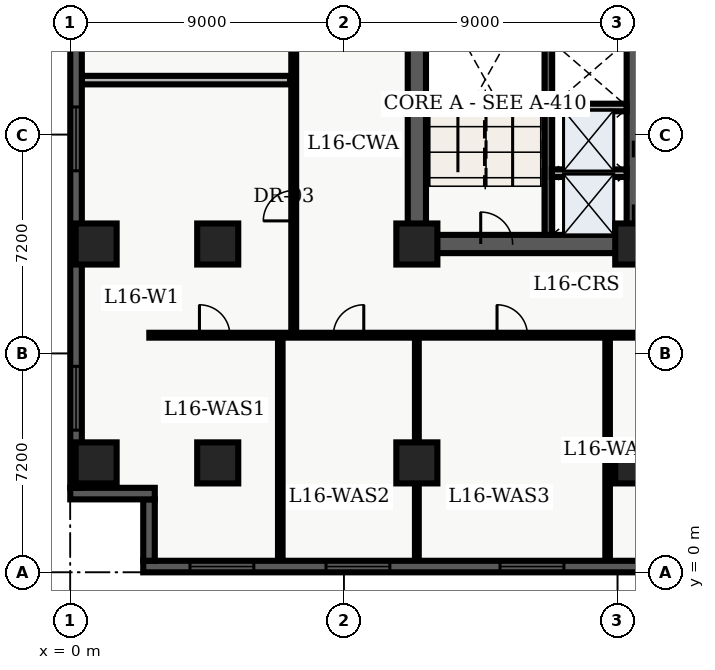
"""IFC4 building model, lengths in metres.
Left out: names, types, materials, properties, quantities, classifications, styles, units other than length and angle.
Written with IfcOpenShell. Run it as: python <this file> out.ifc"""

import sys

from ifc_helpers import new_model, entity, si_unit, converted_unit, direction, frame, origin_with_axes, origin_2d_with_axis, place, context, subcontext, project, spatial, polyline, rectangle, outline, extrude, element, fill, save


model = new_model("IFC4")
c1 = context("Model", 3, precision=1e-05, world=origin_with_axes(), true_north=direction((0.0, 1.0)))
c2 = subcontext(c1, "Body", "Model", "MODEL_VIEW")
j1 = project(units=[si_unit("LENGTHUNIT", "METRE"), converted_unit("PLANEANGLEUNIT", "DEGREE", entity("IfcPlaneAngleMeasure", 0.017), si_unit("PLANEANGLEUNIT", "RADIAN"), dimensions=[0, 0, 0, 0, 0, 0, 0])], contexts=[c1])
p1 = place(None, origin_with_axes())
s1 = spatial("IfcSite", under=j1, at=p1, CompositionType="ELEMENT")
p2 = place(p1, origin_with_axes())
s2 = spatial("IfcBuilding", under=s1, at=p2, CompositionType="ELEMENT")
p3 = place(p2, frame((0.0, 0.0, 67.8), z_axis=(0.0, 0.0, 1.0), x_axis=(1.0, 0.0, 0.0)))
s3 = spatial("IfcBuildingStorey", under=s2, at=p3, CompositionType="ELEMENT", Elevation=67.8)
p4 = place(p3, frame((11.4, 10.8, 0.0), z_axis=(0.0, 0.0, 1.0), x_axis=(0.0, 1.0, 0.0)))
e1 = element("IfcWall", 1, at=p4, inside=s3, PredefinedType="SHEAR", context=c2, shape_type="SweptSolid", body=[
    extrude(outline(polyline([(0.0, -0.3), (27.0, -0.3), (27.0, 0.3), (0.0, 0.3), (0.0, -0.3)])), origin_with_axes(), (0.0, 0.0, 1.0), 3.66),
])
p5 = place(p3, frame((11.4, 10.8, 0.0), z_axis=(0.0, 0.0, 1.0), x_axis=(1.0, 0.0, 0.0)))
e2 = element("IfcWall", 2, at=p5, inside=s3, PredefinedType="SHEAR", context=c2, shape_type="SweptSolid", body=[
    extrude(outline(polyline([(0.0, -0.3), (7.2, -0.3), (7.2, 0.3), (0.0, 0.3), (0.0, -0.3)])), origin_with_axes(), (0.0, 0.0, 1.0), 3.66),
])
p6 = place(p5, frame((2.625, 0.0, 0.0), z_axis=(0.0, 0.0, 1.0), x_axis=(1.0, 0.0, 0.0)))
e3 = element("IfcOpeningElement", 3, at=p6, cuts=e2, PredefinedType="OPENING", context=c2, shape_type="SweptSolid", body=[
    extrude(rectangle(XDim=1.05, YDim=0.62, at=origin_2d_with_axis()), origin_with_axes(), (0.0, 0.0, 1.0), 2.15),
])
p7 = place(p3, frame((18.6, 10.8, 0.0), z_axis=(0.0, 0.0, 1.0), x_axis=(0.0, 1.0, 0.0)))
e4 = element("IfcWall", 4, at=p7, inside=s3, PredefinedType="SHEAR", context=c2, shape_type="SweptSolid", body=[
    extrude(outline(polyline([(0.0, -0.3), (13.5, -0.3), (13.5, 0.3), (0.0, 0.3), (0.0, -0.3)])), origin_with_axes(), (0.0, 0.0, 1.0), 3.66),
])
p8 = place(p7, frame((1.3, 0.0, 0.0), z_axis=(0.0, 0.0, 1.0), x_axis=(1.0, 0.0, 0.0)))
e5 = element("IfcOpeningElement", 5, at=p8, cuts=e4, PredefinedType="OPENING", context=c2, shape_type="SweptSolid", body=[
    extrude(rectangle(XDim=1.1, YDim=0.62, at=origin_2d_with_axis()), origin_with_axes(), (0.0, 0.0, 1.0), 2.15),
])
p9 = place(p7, frame((3.4, 0.0, 0.0), z_axis=(0.0, 0.0, 1.0), x_axis=(1.0, 0.0, 0.0)))
e6 = element("IfcOpeningElement", 6, at=p9, cuts=e4, PredefinedType="OPENING", context=c2, shape_type="SweptSolid", body=[
    extrude(rectangle(XDim=1.1, YDim=0.62, at=origin_2d_with_axis()), origin_with_axes(), (0.0, 0.0, 1.0), 2.15),
])
p10 = place(p7, frame((11.125, 0.0, 0.0), z_axis=(0.0, 0.0, 1.0), x_axis=(1.0, 0.0, 0.0)))
e7 = element("IfcOpeningElement", 7, at=p10, cuts=e4, PredefinedType="OPENING", context=c2, shape_type="SweptSolid", body=[
    extrude(rectangle(XDim=1.05, YDim=0.62, at=origin_2d_with_axis()), origin_with_axes(), (0.0, 0.0, 1.0), 2.15),
])
p11 = place(p3, frame((15.725, 11.1, 0.0), z_axis=(0.0, 0.0, 1.0), x_axis=(0.0, 1.0, 0.0)))
e8 = element("IfcWall", 8, at=p11, inside=s3, PredefinedType="SHEAR", context=c2, shape_type="SweptSolid", body=[
    extrude(outline(polyline([(0.0, -0.125), (8.6, -0.125), (8.6, 0.125), (0.0, 0.125), (0.0, -0.125)])), origin_with_axes(), (0.0, 0.0, 1.0), 3.66),
])
for number, where, z_axis, x_axis in (
    (9, (11.4, 3.6, 0.0), (0.0, 0.0, 1.0), (1.0, 0.0, 0.0)),
    (10, (11.4, 10.8, 0.0), (0.0, 0.0, 1.0), (1.0, 0.0, 0.0)),
    (11, (18.6, 3.6, 0.0), (0.0, 0.0, 1.0), (1.0, 0.0, 0.0)),
    (12, (18.6, 10.8, 0.0), (0.0, 0.0, 1.0), (1.0, 0.0, 0.0)),
    (13, (4.85, 3.6, 0.0), (0.0, 0.0, 1.0), (1.0, 0.0, 0.0)),
    (14, (4.85, 10.8, 0.0), (0.0, 0.0, 1.0), (1.0, 0.0, 0.0)),
    (15, (0.85, 3.6, 0.0), (0.0, 0.0, 1.0), (1.0, 0.0, 0.0)),
    (16, (0.85, 10.8, 0.0), (0.0, 0.0, 1.0), (1.0, 0.0, 0.0)),
):
    element("IfcColumn", number, at=place(p3, frame(where, z_axis=z_axis, x_axis=x_axis)), inside=s3, PredefinedType="COLUMN", context=c2, shape_type="SweptSolid", body=[
        extrude(rectangle(XDim=1.35, YDim=1.35, at=origin_2d_with_axis()), origin_with_axes(), (0.0, 0.0, 1.0), 3.9),
    ])
for number, where, z_axis, x_axis in (
    (17, (15.84, 13.13, 0.0), (0.0, 0.0, 1.0), (1.0, 0.0, 0.0)),
    (18, (15.84, 15.29, 0.0), (0.0, 0.0, 1.0), (1.0, 0.0, 0.0)),
):
    element("IfcWall", number, at=place(p3, frame(where, z_axis=z_axis, x_axis=x_axis)), inside=s3, PredefinedType="SOLIDWALL", context=c2, shape_type="SweptSolid", body=[
        extrude(outline(polyline([(0.0, -0.125), (2.46, -0.125), (2.46, 0.125), (0.0, 0.125), (0.0, -0.125)])), origin_with_axes(), (0.0, 0.0, 1.0), 2.7),
    ])
p12 = place(p3, frame((2.6, 7.8, 0.0), z_axis=(0.0, 0.0, 1.0), x_axis=(1.0, 0.0, 0.0)))
e19 = element("IfcWall", 19, at=p12, inside=s3, PredefinedType="PARTITIONING", context=c2, shape_type="SweptSolid", body=[
    extrude(outline(polyline([(0.0, -0.08), (18.55, -0.08), (18.55, 0.08), (0.0, 0.08), (0.0, -0.08)])), origin_with_axes(), (0.0, 0.0, 1.0), 2.7),
])
p13 = place(p12, frame((2.149, 0.0, 0.0), z_axis=(0.0, 0.0, 1.0), x_axis=(1.0, 0.0, 0.0)))
e20 = element("IfcOpeningElement", 20, at=p13, cuts=e19, PredefinedType="OPENING", context=c2, shape_type="SweptSolid", body=[
    extrude(rectangle(XDim=1.0, YDim=0.18, at=origin_2d_with_axis()), origin_with_axes(), (0.0, 0.0, 1.0), 2.15),
])
p14 = place(p12, frame((6.554, 0.0, 0.0), z_axis=(0.0, 0.0, 1.0), x_axis=(1.0, 0.0, 0.0)))
e21 = element("IfcOpeningElement", 21, at=p14, cuts=e19, PredefinedType="OPENING", context=c2, shape_type="SweptSolid", body=[
    extrude(rectangle(XDim=1.0, YDim=0.18, at=origin_2d_with_axis()), origin_with_axes(), (0.0, 0.0, 1.0), 2.15),
])
p15 = place(p12, frame((11.937, 0.0, 0.0), z_axis=(0.0, 0.0, 1.0), x_axis=(1.0, 0.0, 0.0)))
e22 = element("IfcOpeningElement", 22, at=p15, cuts=e19, PredefinedType="OPENING", context=c2, shape_type="SweptSolid", body=[
    extrude(rectangle(XDim=1.0, YDim=0.18, at=origin_2d_with_axis()), origin_with_axes(), (0.0, 0.0, 1.0), 2.15),
])
p16 = place(p12, frame((16.507, 0.0, 0.0), z_axis=(0.0, 0.0, 1.0), x_axis=(1.0, 0.0, 0.0)))
e23 = element("IfcOpeningElement", 23, at=p16, cuts=e19, PredefinedType="OPENING", context=c2, shape_type="SweptSolid", body=[
    extrude(rectangle(XDim=1.0, YDim=0.18, at=origin_2d_with_axis()), origin_with_axes(), (0.0, 0.0, 1.0), 2.15),
])
p17 = place(p3, frame((7.35, 7.8, 0.0), z_axis=(0.0, 0.0, 1.0), x_axis=(0.0, 1.0, 0.0)))
e24 = element("IfcWall", 24, at=p17, inside=s3, PredefinedType="PARTITIONING", context=c2, shape_type="SweptSolid", body=[
    extrude(outline(polyline([(0.0, -0.08), (32.7, -0.08), (32.7, 0.08), (0.0, 0.08), (0.0, -0.08)])), origin_with_axes(), (0.0, 0.0, 1.0), 2.7),
])
p18 = place(p17, frame((4.261, 0.0, 0.0), z_axis=(0.0, 0.0, 1.0), x_axis=(1.0, 0.0, 0.0)))
e25 = element("IfcOpeningElement", 25, at=p18, cuts=e24, PredefinedType="OPENING", context=c2, shape_type="SweptSolid", body=[
    extrude(rectangle(XDim=1.0, YDim=0.18, at=origin_2d_with_axis()), origin_with_axes(), (0.0, 0.0, 1.0), 2.15),
])
p19 = place(p17, frame((13.729, 0.0, 0.0), z_axis=(0.0, 0.0, 1.0), x_axis=(1.0, 0.0, 0.0)))
e26 = element("IfcOpeningElement", 26, at=p19, cuts=e24, PredefinedType="OPENING", context=c2, shape_type="SweptSolid", body=[
    extrude(rectangle(XDim=1.0, YDim=0.18, at=origin_2d_with_axis()), origin_with_axes(), (0.0, 0.0, 1.0), 2.15),
])
p20 = place(p17, frame((25.819, 0.0, 0.0), z_axis=(0.0, 0.0, 1.0), x_axis=(1.0, 0.0, 0.0)))
e27 = element("IfcOpeningElement", 27, at=p20, cuts=e24, PredefinedType="OPENING", context=c2, shape_type="SweptSolid", body=[
    extrude(rectangle(XDim=1.0, YDim=0.18, at=origin_2d_with_axis()), origin_with_axes(), (0.0, 0.0, 1.0), 2.15),
])
p21 = place(p3, frame((0.375, 16.191, 0.0), z_axis=(0.0, 0.0, 1.0), x_axis=(1.0, 0.0, 0.0)))
e28 = element("IfcWall", 28, at=p21, inside=s3, PredefinedType="PARTITIONING", context=c2, shape_type="SweptSolid", body=[
    extrude(outline(polyline([(0.0, -0.14), (6.855, -0.14), (6.855, 0.14), (0.0, 0.14), (0.0, -0.14)])), origin_with_axes(), (0.0, 0.0, 1.0), 2.7),
])
p22 = place(p3, frame((6.908, 0.36, 0.0), z_axis=(0.0, 0.0, 1.0), x_axis=(0.0, 1.0, 0.0)))
e29 = element("IfcWall", 29, at=p22, inside=s3, PredefinedType="PARTITIONING", context=c2, shape_type="SweptSolid", body=[
    extrude(outline(polyline([(0.0, -0.075), (7.34, -0.075), (7.34, 0.075), (0.0, 0.075), (0.0, -0.075)])), origin_with_axes(), (0.0, 0.0, 1.0), 2.7),
])
p23 = place(p3, frame((11.4, 0.36, 0.0), z_axis=(0.0, 0.0, 1.0), x_axis=(0.0, 1.0, 0.0)))
e30 = element("IfcWall", 30, at=p23, inside=s3, PredefinedType="PARTITIONING", context=c2, shape_type="SweptSolid", body=[
    extrude(outline(polyline([(0.0, -0.062), (7.34, -0.062), (7.34, 0.062), (0.0, 0.062), (0.0, -0.062)])), origin_with_axes(), (0.0, 0.0, 1.0), 2.7),
])
p24 = place(p3, frame((17.674, 0.36, 0.0), z_axis=(0.0, 0.0, 1.0), x_axis=(0.0, 1.0, 0.0)))
e31 = element("IfcWall", 31, at=p24, inside=s3, PredefinedType="PARTITIONING", context=c2, shape_type="SweptSolid", body=[
    extrude(outline(polyline([(0.0, -0.075), (7.34, -0.075), (7.34, 0.075), (0.0, 0.075), (0.0, -0.075)])), origin_with_axes(), (0.0, 0.0, 1.0), 2.7),
])
p25 = place(p3, frame((57.22, 0.19, 0.0), z_axis=(0.0, 0.0, 1.0), x_axis=(-1.0, 0.0, 0.0)))
e32 = element("IfcWall", 32, at=p25, inside=s3, PredefinedType="SOLIDWALL", context=c2, shape_type="SweptSolid", body=[
    extrude(outline(polyline([(0.0, -0.19), (54.82, -0.19), (54.82, 0.19), (0.0, 0.19), (0.0, -0.19)])), origin_with_axes(), (0.0, 0.0, 1.0), 3.66),
])
p26 = place(p25, frame((3.037, 0.0, 0.45), z_axis=(0.0, 0.0, 1.0), x_axis=(1.0, 0.0, 0.0)))
e33 = element("IfcOpeningElement", 33, at=p26, cuts=e32, PredefinedType="OPENING", context=c2, shape_type="SweptSolid", body=[
    extrude(rectangle(XDim=2.1, YDim=0.4, at=origin_2d_with_axis()), origin_with_axes(), (0.0, 0.0, 1.0), 2.2),
])
p27 = place(p25, frame((7.912, 0.0, 0.45), z_axis=(0.0, 0.0, 1.0), x_axis=(1.0, 0.0, 0.0)))
e34 = element("IfcOpeningElement", 34, at=p27, cuts=e32, PredefinedType="OPENING", context=c2, shape_type="SweptSolid", body=[
    extrude(rectangle(XDim=2.1, YDim=0.4, at=origin_2d_with_axis()), origin_with_axes(), (0.0, 0.0, 1.0), 2.2),
])
p28 = place(p25, frame((12.786, 0.0, 0.45), z_axis=(0.0, 0.0, 1.0), x_axis=(1.0, 0.0, 0.0)))
e35 = element("IfcOpeningElement", 35, at=p28, cuts=e32, PredefinedType="OPENING", context=c2, shape_type="SweptSolid", body=[
    extrude(rectangle(XDim=2.1, YDim=0.4, at=origin_2d_with_axis()), origin_with_axes(), (0.0, 0.0, 1.0), 2.2),
])
p29 = place(p25, frame((17.661, 0.0, 0.45), z_axis=(0.0, 0.0, 1.0), x_axis=(1.0, 0.0, 0.0)))
e36 = element("IfcOpeningElement", 36, at=p29, cuts=e32, PredefinedType="OPENING", context=c2, shape_type="SweptSolid", body=[
    extrude(rectangle(XDim=2.1, YDim=0.4, at=origin_2d_with_axis()), origin_with_axes(), (0.0, 0.0, 1.0), 2.2),
])
p30 = place(p25, frame((22.535, 0.0, 0.45), z_axis=(0.0, 0.0, 1.0), x_axis=(1.0, 0.0, 0.0)))
e37 = element("IfcOpeningElement", 37, at=p30, cuts=e32, PredefinedType="OPENING", context=c2, shape_type="SweptSolid", body=[
    extrude(rectangle(XDim=2.1, YDim=0.4, at=origin_2d_with_axis()), origin_with_axes(), (0.0, 0.0, 1.0), 2.2),
])
p31 = place(p25, frame((27.41, 0.0, 0.45), z_axis=(0.0, 0.0, 1.0), x_axis=(1.0, 0.0, 0.0)))
e38 = element("IfcOpeningElement", 38, at=p31, cuts=e32, PredefinedType="OPENING", context=c2, shape_type="SweptSolid", body=[
    extrude(rectangle(XDim=2.1, YDim=0.4, at=origin_2d_with_axis()), origin_with_axes(), (0.0, 0.0, 1.0), 2.2),
])
p32 = place(p25, frame((32.285, 0.0, 0.45), z_axis=(0.0, 0.0, 1.0), x_axis=(1.0, 0.0, 0.0)))
e39 = element("IfcOpeningElement", 39, at=p32, cuts=e32, PredefinedType="OPENING", context=c2, shape_type="SweptSolid", body=[
    extrude(rectangle(XDim=2.1, YDim=0.4, at=origin_2d_with_axis()), origin_with_axes(), (0.0, 0.0, 1.0), 2.2),
])
p33 = place(p25, frame((37.159, 0.0, 0.45), z_axis=(0.0, 0.0, 1.0), x_axis=(1.0, 0.0, 0.0)))
e40 = element("IfcOpeningElement", 40, at=p33, cuts=e32, PredefinedType="OPENING", context=c2, shape_type="SweptSolid", body=[
    extrude(rectangle(XDim=2.1, YDim=0.4, at=origin_2d_with_axis()), origin_with_axes(), (0.0, 0.0, 1.0), 2.2),
])
p34 = place(p25, frame((42.034, 0.0, 0.45), z_axis=(0.0, 0.0, 1.0), x_axis=(1.0, 0.0, 0.0)))
e41 = element("IfcOpeningElement", 41, at=p34, cuts=e32, PredefinedType="OPENING", context=c2, shape_type="SweptSolid", body=[
    extrude(rectangle(XDim=2.1, YDim=0.4, at=origin_2d_with_axis()), origin_with_axes(), (0.0, 0.0, 1.0), 2.2),
])
p35 = place(p25, frame((47.758, 0.0, 0.45), z_axis=(0.0, 0.0, 1.0), x_axis=(1.0, 0.0, 0.0)))
e42 = element("IfcOpeningElement", 42, at=p35, cuts=e32, PredefinedType="OPENING", context=c2, shape_type="SweptSolid", body=[
    extrude(rectangle(XDim=2.1, YDim=0.4, at=origin_2d_with_axis()), origin_with_axes(), (0.0, 0.0, 1.0), 2.2),
])
p36 = place(p25, frame((52.233, 0.0, 0.45), z_axis=(0.0, 0.0, 1.0), x_axis=(1.0, 0.0, 0.0)))
e43 = element("IfcOpeningElement", 43, at=p36, cuts=e32, PredefinedType="OPENING", context=c2, shape_type="SweptSolid", body=[
    extrude(rectangle(XDim=2.1, YDim=0.4, at=origin_2d_with_axis()), origin_with_axes(), (0.0, 0.0, 1.0), 2.2),
])
p37 = place(p3, frame((2.59, 0.38, 0.0), z_axis=(0.0, 0.0, 1.0), x_axis=(0.0, 1.0, 0.0)))
e44 = element("IfcWall", 44, at=p37, inside=s3, PredefinedType="SOLIDWALL", context=c2, shape_type="SweptSolid", body=[
    extrude(outline(polyline([(0.0, -0.19), (2.02, -0.19), (2.02, 0.19), (0.0, 0.19), (0.0, -0.19)])), origin_with_axes(), (0.0, 0.0, 1.0), 3.66),
])
p38 = place(p3, frame((2.78, 2.59, 0.0), z_axis=(0.0, 0.0, 1.0), x_axis=(-1.0, 0.0, 0.0)))
e45 = element("IfcWall", 45, at=p38, inside=s3, PredefinedType="SOLIDWALL", context=c2, shape_type="SweptSolid", body=[
    extrude(outline(polyline([(0.0, -0.19), (2.78, -0.19), (2.78, 0.19), (0.0, 0.19), (0.0, -0.19)])), origin_with_axes(), (0.0, 0.0, 1.0), 3.66),
])
p39 = place(p3, frame((0.19, 2.78, 0.0), z_axis=(0.0, 0.0, 1.0), x_axis=(0.0, 1.0, 0.0)))
e46 = element("IfcWall", 46, at=p39, inside=s3, PredefinedType="SOLIDWALL", context=c2, shape_type="SweptSolid", body=[
    extrude(outline(polyline([(0.0, -0.19), (43.42, -0.19), (43.42, 0.19), (0.0, 0.19), (0.0, -0.19)])), origin_with_axes(), (0.0, 0.0, 1.0), 3.66),
])
p40 = place(p39, frame((2.946, 0.0, 0.45), z_axis=(0.0, 0.0, 1.0), x_axis=(1.0, 0.0, 0.0)))
e47 = element("IfcOpeningElement", 47, at=p40, cuts=e46, PredefinedType="OPENING", context=c2, shape_type="SweptSolid", body=[
    extrude(rectangle(XDim=2.1, YDim=0.4, at=origin_2d_with_axis()), origin_with_axes(), (0.0, 0.0, 1.0), 2.2),
])
p41 = place(p39, frame((11.478, 0.0, 0.45), z_axis=(0.0, 0.0, 1.0), x_axis=(1.0, 0.0, 0.0)))
e48 = element("IfcOpeningElement", 48, at=p41, cuts=e46, PredefinedType="OPENING", context=c2, shape_type="SweptSolid", body=[
    extrude(rectangle(XDim=2.1, YDim=0.4, at=origin_2d_with_axis()), origin_with_axes(), (0.0, 0.0, 1.0), 2.2),
])
p42 = place(p39, frame((17.469, 0.0, 0.45), z_axis=(0.0, 0.0, 1.0), x_axis=(1.0, 0.0, 0.0)))
e49 = element("IfcOpeningElement", 49, at=p42, cuts=e46, PredefinedType="OPENING", context=c2, shape_type="SweptSolid", body=[
    extrude(rectangle(XDim=2.1, YDim=0.4, at=origin_2d_with_axis()), origin_with_axes(), (0.0, 0.0, 1.0), 2.2),
])
p43 = place(p39, frame((21.71, 0.0, 0.45), z_axis=(0.0, 0.0, 1.0), x_axis=(1.0, 0.0, 0.0)))
e50 = element("IfcOpeningElement", 50, at=p43, cuts=e46, PredefinedType="OPENING", context=c2, shape_type="SweptSolid", body=[
    extrude(rectangle(XDim=2.1, YDim=0.4, at=origin_2d_with_axis()), origin_with_axes(), (0.0, 0.0, 1.0), 2.2),
])
p44 = place(p39, frame((26.401, 0.0, 0.45), z_axis=(0.0, 0.0, 1.0), x_axis=(1.0, 0.0, 0.0)))
e51 = element("IfcOpeningElement", 51, at=p44, cuts=e46, PredefinedType="OPENING", context=c2, shape_type="SweptSolid", body=[
    extrude(rectangle(XDim=2.1, YDim=0.4, at=origin_2d_with_axis()), origin_with_axes(), (0.0, 0.0, 1.0), 2.2),
])
p45 = place(p39, frame((31.092, 0.0, 0.45), z_axis=(0.0, 0.0, 1.0), x_axis=(1.0, 0.0, 0.0)))
e52 = element("IfcOpeningElement", 52, at=p45, cuts=e46, PredefinedType="OPENING", context=c2, shape_type="SweptSolid", body=[
    extrude(rectangle(XDim=2.1, YDim=0.4, at=origin_2d_with_axis()), origin_with_axes(), (0.0, 0.0, 1.0), 2.2),
])
p46 = place(p39, frame((40.024, 0.0, 0.45), z_axis=(0.0, 0.0, 1.0), x_axis=(1.0, 0.0, 0.0)))
e53 = element("IfcOpeningElement", 53, at=p46, cuts=e46, PredefinedType="OPENING", context=c2, shape_type="SweptSolid", body=[
    extrude(rectangle(XDim=2.1, YDim=0.4, at=origin_2d_with_axis()), origin_with_axes(), (0.0, 0.0, 1.0), 2.2),
])
p47 = place(p7, frame((1.3, 0.0, 0.0), z_axis=(0.0, 0.0, 1.0), x_axis=(1.0, 0.0, 0.0)))
e54 = element("IfcDoor", 54, at=p47, inside=s3, OperationType="SLIDING_TO_LEFT", PredefinedType="DOOR", context=c2, shape_type="SweptSolid", body=[
    extrude(rectangle(XDim=1.1, YDim=0.09, at=origin_2d_with_axis()), origin_with_axes(), (0.0, 0.0, 1.0), 2.15),
])
fill(e5, e54)
p48 = place(p7, frame((3.4, 0.0, 0.0), z_axis=(0.0, 0.0, 1.0), x_axis=(1.0, 0.0, 0.0)))
e55 = element("IfcDoor", 55, at=p48, inside=s3, OperationType="SLIDING_TO_RIGHT", PredefinedType="DOOR", context=c2, shape_type="SweptSolid", body=[
    extrude(rectangle(XDim=1.1, YDim=0.09, at=origin_2d_with_axis()), origin_with_axes(), (0.0, 0.0, 1.0), 2.15),
])
fill(e6, e55)
p49 = place(p5, frame((2.625, 0.0, 0.0), z_axis=(0.0, 0.0, 1.0), x_axis=(1.0, 0.0, 0.0)))
e56 = element("IfcDoor", 56, at=p49, inside=s3, OperationType="SINGLE_SWING_LEFT", PredefinedType="DOOR", context=c2, shape_type="SweptSolid", body=[
    extrude(rectangle(XDim=1.05, YDim=0.09, at=origin_2d_with_axis()), origin_with_axes(), (0.0, 0.0, 1.0), 2.15),
])
fill(e3, e56)
p50 = place(p17, frame((4.261, 0.0, 0.0), z_axis=(0.0, 0.0, 1.0), x_axis=(1.0, 0.0, 0.0)))
e57 = element("IfcDoor", 57, at=p50, inside=s3, OperationType="SINGLE_SWING_LEFT", PredefinedType="DOOR", context=c2, shape_type="SweptSolid", body=[
    extrude(rectangle(XDim=1.0, YDim=0.09, at=origin_2d_with_axis()), origin_with_axes(), (0.0, 0.0, 1.0), 2.15),
])
fill(e25, e57)
p51 = place(p12, frame((2.149, 0.0, 0.0), z_axis=(0.0, 0.0, 1.0), x_axis=(1.0, 0.0, 0.0)))
e58 = element("IfcDoor", 58, at=p51, inside=s3, OperationType="SINGLE_SWING_LEFT", PredefinedType="DOOR", context=c2, shape_type="SweptSolid", body=[
    extrude(rectangle(XDim=1.0, YDim=0.09, at=origin_2d_with_axis()), origin_with_axes(), (0.0, 0.0, 1.0), 2.15),
])
fill(e20, e58)
p52 = place(p12, frame((6.554, 0.0, 0.0), z_axis=(0.0, 0.0, 1.0), x_axis=(1.0, 0.0, 0.0)))
e59 = element("IfcDoor", 59, at=p52, inside=s3, OperationType="SINGLE_SWING_RIGHT", PredefinedType="DOOR", context=c2, shape_type="SweptSolid", body=[
    extrude(rectangle(XDim=1.0, YDim=0.09, at=origin_2d_with_axis()), origin_with_axes(), (0.0, 0.0, 1.0), 2.15),
])
fill(e21, e59)
p53 = place(p12, frame((11.937, 0.0, 0.0), z_axis=(0.0, 0.0, 1.0), x_axis=(1.0, 0.0, 0.0)))
e60 = element("IfcDoor", 60, at=p53, inside=s3, OperationType="SINGLE_SWING_LEFT", PredefinedType="DOOR", context=c2, shape_type="SweptSolid", body=[
    extrude(rectangle(XDim=1.0, YDim=0.09, at=origin_2d_with_axis()), origin_with_axes(), (0.0, 0.0, 1.0), 2.15),
])
fill(e22, e60)
p54 = place(p25, frame((42.034, 0.0, 0.45), z_axis=(0.0, 0.0, 1.0), x_axis=(1.0, 0.0, 0.0)))
e61 = element("IfcWindow", 61, at=p54, inside=s3, PredefinedType="WINDOW", context=c2, shape_type="SweptSolid", body=[
    extrude(rectangle(XDim=2.1, YDim=0.09, at=origin_2d_with_axis()), origin_with_axes(), (0.0, 0.0, 1.0), 2.2),
])
fill(e41, e61)
p55 = place(p25, frame((47.758, 0.0, 0.45), z_axis=(0.0, 0.0, 1.0), x_axis=(1.0, 0.0, 0.0)))
e62 = element("IfcWindow", 62, at=p55, inside=s3, PredefinedType="WINDOW", context=c2, shape_type="SweptSolid", body=[
    extrude(rectangle(XDim=2.1, YDim=0.09, at=origin_2d_with_axis()), origin_with_axes(), (0.0, 0.0, 1.0), 2.2),
])
fill(e42, e62)
p56 = place(p25, frame((52.233, 0.0, 0.45), z_axis=(0.0, 0.0, 1.0), x_axis=(1.0, 0.0, 0.0)))
e63 = element("IfcWindow", 63, at=p56, inside=s3, PredefinedType="WINDOW", context=c2, shape_type="SweptSolid", body=[
    extrude(rectangle(XDim=2.1, YDim=0.09, at=origin_2d_with_axis()), origin_with_axes(), (0.0, 0.0, 1.0), 2.2),
])
fill(e43, e63)
p57 = place(p39, frame((2.946, 0.0, 0.45), z_axis=(0.0, 0.0, 1.0), x_axis=(1.0, 0.0, 0.0)))
e64 = element("IfcWindow", 64, at=p57, inside=s3, PredefinedType="WINDOW", context=c2, shape_type="SweptSolid", body=[
    extrude(rectangle(XDim=2.1, YDim=0.09, at=origin_2d_with_axis()), origin_with_axes(), (0.0, 0.0, 1.0), 2.2),
])
fill(e47, e64)
p58 = place(p39, frame((11.478, 0.0, 0.45), z_axis=(0.0, 0.0, 1.0), x_axis=(1.0, 0.0, 0.0)))
e65 = element("IfcWindow", 65, at=p58, inside=s3, PredefinedType="WINDOW", context=c2, shape_type="SweptSolid", body=[
    extrude(rectangle(XDim=2.1, YDim=0.09, at=origin_2d_with_axis()), origin_with_axes(), (0.0, 0.0, 1.0), 2.2),
])
fill(e48, e65)
save(model, sys.argv[1])
